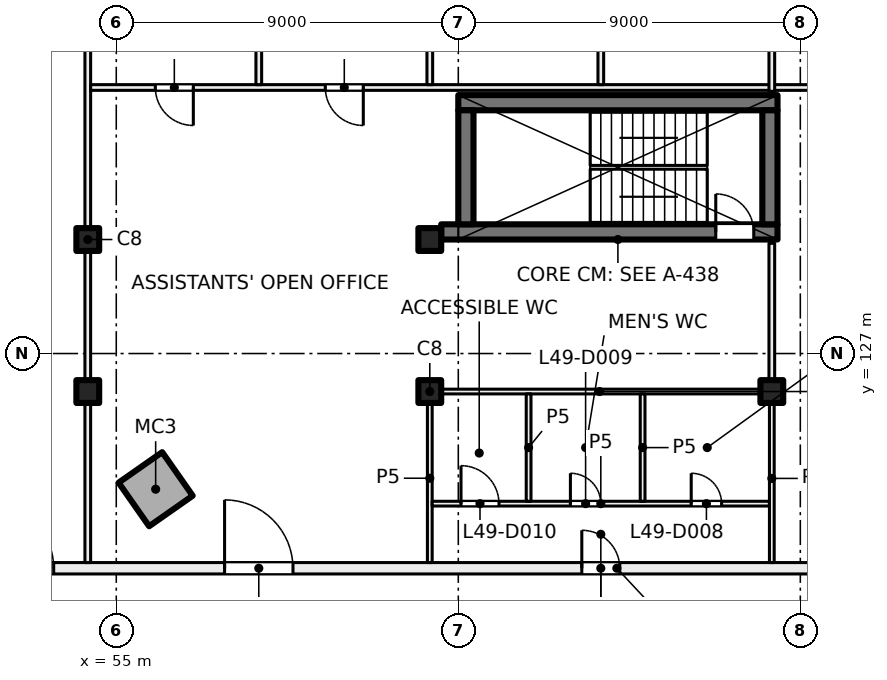
"""IFC4 building model, lengths in metres.
Left out: names, types, materials, properties, quantities, classifications, styles, units other than length and angle.
Written with IfcOpenShell. Run it as: python <this file> out.ifc"""

import sys

from ifc_helpers import new_model, si_unit, direction, frame, frame_2d, origin, origin_2d, place, context, subcontext, project, spatial, rectangle, hollow_rectangle, extrude, element, fill, save


model = new_model("IFC4")
c1 = context("Model", 3, precision=1e-05, world=origin(), true_north=direction((0.0, 1.0)))
c2 = subcontext(c1, "Body", "Model", "MODEL_VIEW")
j1 = project(units=[si_unit("LENGTHUNIT", "METRE"), si_unit("PLANEANGLEUNIT", "RADIAN")], contexts=[c1])
p1 = place(None, origin())
s1 = spatial("IfcSite", under=j1, at=p1, CompositionType="ELEMENT")
p2 = place(p1, origin())
s2 = spatial("IfcBuilding", under=s1, at=p2, CompositionType="ELEMENT")
p3 = place(p2, frame((0.0, 0.0, 208.0)))
s3 = spatial("IfcBuildingStorey", under=s2, at=p3, CompositionType="ELEMENT", Elevation=208.0)
p4 = place(p3, frame((56.036, 123.43, 0.0), z_axis=(0.0, 0.0, 1.0), x_axis=(0.573576436351, -0.819152044289, 0.0)))
e1 = element("IfcColumn", 1, at=p4, inside=s3, PredefinedType="COLUMN", context=c2, shape_type="SweptSolid", body=[
    extrude(hollow_rectangle(XDim=1.4, YDim=1.4, WallThickness=0.032, at=origin_2d()), origin(), (0.0, 0.0, 1.0), 4.0),
])
for number, where, z_axis, x_axis in (
    (2, (54.25, 130.0, 0.0), (0.0, 0.0, 1.0), (1.0, 0.0, 0.0)),
    (3, (63.25, 130.0, 0.0), (0.0, 0.0, 1.0), (1.0, 0.0, 0.0)),
    (4, (54.25, 126.0, 0.0), (0.0, 0.0, 1.0), (1.0, 0.0, 0.0)),
    (5, (63.25, 126.0, 0.0), (0.0, 0.0, 1.0), (1.0, 0.0, 0.0)),
    (6, (72.25, 126.0, 0.0), (0.0, 0.0, 1.0), (1.0, 0.0, 0.0)),
):
    element("IfcColumn", number, at=place(p3, frame(where, z_axis=z_axis, x_axis=x_axis)), inside=s3, PredefinedType="COLUMN", context=c2, shape_type="SweptSolid", body=[
        extrude(rectangle(XDim=0.6, YDim=0.6, at=origin_2d()), origin(), (0.0, 0.0, 1.0), 4.0),
    ])
p5 = place(p3, frame((63.55, 130.2, 0.0), z_axis=(0.0, 0.0, 1.0), x_axis=(1.0, 0.0, 0.0)))
e7 = element("IfcWall", 7, at=p5, inside=s3, PredefinedType="SHEAR", context=c2, shape_type="SweptSolid", body=[
    extrude(rectangle(XDim=8.85, YDim=0.4, at=frame_2d((4.425, 0.0))), origin(), (0.0, 0.0, 1.0), 4.0),
])
p6 = place(p5, frame((7.225, 0.0, 0.0)))
e8 = element("IfcOpeningElement", 8, at=p6, cuts=e7, PredefinedType="OPENING", context=c2, shape_type="SweptSolid", body=[
    extrude(rectangle(XDim=1.0, YDim=2.1, at=frame_2d((0.5, 1.05))), frame((0.0, 0.21, 0.0), z_axis=(0.0, -1.0, 0.0), x_axis=(1.0, 0.0, 0.0)), (0.0, 0.0, 1.0), 0.42),
])
p7 = place(p3, frame((64.0, 133.6, 0.0), z_axis=(0.0, 0.0, 1.0), x_axis=(1.0, 0.0, 0.0)))
e9 = element("IfcWall", 9, at=p7, inside=s3, PredefinedType="SHEAR", context=c2, shape_type="SweptSolid", body=[
    extrude(rectangle(XDim=8.4, YDim=0.4, at=frame_2d((4.2, 0.0))), origin(), (0.0, 0.0, 1.0), 4.0),
])
for number, where, z_axis, x_axis in (
    (10, (64.2, 130.4, 0.0), (0.0, 0.0, 1.0), (0.0, 1.0, 0.0)),
    (11, (72.2, 130.4, 0.0), (0.0, 0.0, 1.0), (0.0, 1.0, 0.0)),
):
    element("IfcWall", number, at=place(p3, frame(where, z_axis=z_axis, x_axis=x_axis)), inside=s3, PredefinedType="SHEAR", context=c2, shape_type="SweptSolid", body=[
        extrude(rectangle(XDim=3.0, YDim=0.4, at=frame_2d((1.5, 0.0))), origin(), (0.0, 0.0, 1.0), 4.0),
    ])
p8 = place(p3, frame((50.506, 121.35, 0.0), z_axis=(0.0, 0.0, 1.0), x_axis=(1.0, 0.0, 0.0)))
e12 = element("IfcWall", 12, at=p8, inside=s3, PredefinedType="PARTITIONING", context=c2, shape_type="SweptSolid", body=[
    extrude(rectangle(XDim=35.332, YDim=0.3, at=frame_2d((17.666, 0.0))), origin(), (0.0, 0.0, 1.0), 3.625),
])
p9 = place(p8, frame((32.394, 0.0, 0.0)))
e13 = element("IfcOpeningElement", 13, at=p9, cuts=e12, PredefinedType="OPENING", context=c2, shape_type="SweptSolid", body=[
    extrude(rectangle(XDim=1.2, YDim=2.1, at=frame_2d((0.6, 1.05))), frame((0.0, 0.16, 0.0), z_axis=(0.0, -1.0, 0.0), x_axis=(1.0, 0.0, 0.0)), (0.0, 0.0, 1.0), 0.32),
])
p10 = place(p8, frame((28.744, 0.0, 0.0)))
e14 = element("IfcOpeningElement", 14, at=p10, cuts=e12, PredefinedType="OPENING", context=c2, shape_type="SweptSolid", body=[
    extrude(rectangle(XDim=1.0, YDim=2.1, at=frame_2d((0.5, 1.05))), frame((0.0, 0.16, 0.0), z_axis=(0.0, -1.0, 0.0), x_axis=(1.0, 0.0, 0.0)), (0.0, 0.0, 1.0), 0.32),
])
p11 = place(p8, frame((23.844, 0.0, 0.0)))
e15 = element("IfcOpeningElement", 15, at=p11, cuts=e12, PredefinedType="OPENING", context=c2, shape_type="SweptSolid", body=[
    extrude(rectangle(XDim=1.8, YDim=2.1, at=frame_2d((0.9, 1.05))), frame((0.0, 0.16, 0.0), z_axis=(0.0, -1.0, 0.0), x_axis=(1.0, 0.0, 0.0)), (0.0, 0.0, 1.0), 0.32),
])
p12 = place(p8, frame((16.744, 0.0, 0.0)))
e16 = element("IfcOpeningElement", 16, at=p12, cuts=e12, PredefinedType="OPENING", context=c2, shape_type="SweptSolid", body=[
    extrude(rectangle(XDim=1.0, YDim=2.1, at=frame_2d((0.5, 1.05))), frame((0.0, 0.16, 0.0), z_axis=(0.0, -1.0, 0.0), x_axis=(1.0, 0.0, 0.0)), (0.0, 0.0, 1.0), 0.32),
])
p13 = place(p8, frame((7.344, 0.0, 0.0)))
e17 = element("IfcOpeningElement", 17, at=p13, cuts=e12, PredefinedType="OPENING", context=c2, shape_type="SweptSolid", body=[
    extrude(rectangle(XDim=1.8, YDim=2.1, at=frame_2d((0.9, 1.05))), frame((0.0, 0.16, 0.0), z_axis=(0.0, -1.0, 0.0), x_axis=(1.0, 0.0, 0.0)), (0.0, 0.0, 1.0), 0.32),
])
p14 = place(p8, frame((1.047, 0.0, 0.0)))
e18 = element("IfcOpeningElement", 18, at=p14, cuts=e12, PredefinedType="OPENING", context=c2, shape_type="SweptSolid", body=[
    extrude(rectangle(XDim=1.8, YDim=2.1, at=frame_2d((0.9, 1.05))), frame((0.0, 0.16, 0.0), z_axis=(0.0, -1.0, 0.0), x_axis=(1.0, 0.0, 0.0)), (0.0, 0.0, 1.0), 0.32),
])
p15 = place(p3, frame((54.25, 121.5, 0.0), z_axis=(0.0, 0.0, 1.0), x_axis=(0.0, 1.0, 0.0)))
e19 = element("IfcWall", 19, at=p15, inside=s3, PredefinedType="PARTITIONING", context=c2, shape_type="SweptSolid", body=[
    extrude(rectangle(XDim=16.9, YDim=0.15, at=frame_2d((8.45, 0.0))), origin(), (0.0, 0.0, 1.0), 3.625),
])
p16 = place(p3, frame((81.325, 134.0, 0.0), z_axis=(0.0, 0.0, 1.0), x_axis=(-1.0, 0.0, 0.0)))
e20 = element("IfcWall", 20, at=p16, inside=s3, PredefinedType="PARTITIONING", context=c2, shape_type="SweptSolid", body=[
    extrude(rectangle(XDim=27.0, YDim=0.15, at=frame_2d((13.5, 0.0))), origin(), (0.0, 0.0, 1.0), 3.625),
])
p17 = place(p16, frame((1.825, 0.0, 0.0)))
e21 = element("IfcOpeningElement", 21, at=p17, cuts=e20, PredefinedType="OPENING", context=c2, shape_type="SweptSolid", body=[
    extrude(rectangle(XDim=1.0, YDim=2.1, at=frame_2d((0.5, 1.05))), frame((0.0, 0.085, 0.0), z_axis=(0.0, -1.0, 0.0), x_axis=(1.0, 0.0, 0.0)), (0.0, 0.0, 1.0), 0.17),
])
p18 = place(p16, frame((6.325, 0.0, 0.0)))
e22 = element("IfcOpeningElement", 22, at=p18, cuts=e20, PredefinedType="OPENING", context=c2, shape_type="SweptSolid", body=[
    extrude(rectangle(XDim=1.0, YDim=2.1, at=frame_2d((0.5, 1.05))), frame((0.0, 0.085, 0.0), z_axis=(0.0, -1.0, 0.0), x_axis=(1.0, 0.0, 0.0)), (0.0, 0.0, 1.0), 0.17),
])
p19 = place(p16, frame((19.825, 0.0, 0.0)))
e23 = element("IfcOpeningElement", 23, at=p19, cuts=e20, PredefinedType="OPENING", context=c2, shape_type="SweptSolid", body=[
    extrude(rectangle(XDim=1.0, YDim=2.1, at=frame_2d((0.5, 1.05))), frame((0.0, 0.085, 0.0), z_axis=(0.0, -1.0, 0.0), x_axis=(1.0, 0.0, 0.0)), (0.0, 0.0, 1.0), 0.17),
])
p20 = place(p16, frame((24.298, 0.0, 0.0)))
e24 = element("IfcOpeningElement", 24, at=p20, cuts=e20, PredefinedType="OPENING", context=c2, shape_type="SweptSolid", body=[
    extrude(rectangle(XDim=1.0, YDim=2.1, at=frame_2d((0.5, 1.05))), frame((0.0, 0.085, 0.0), z_axis=(0.0, -1.0, 0.0), x_axis=(1.0, 0.0, 0.0)), (0.0, 0.0, 1.0), 0.17),
])
p21 = place(p3, frame((58.75, 134.075, 0.0), z_axis=(0.0, 0.0, 1.0), x_axis=(0.0, 1.0, 0.0)))
e25 = element("IfcWall", 25, at=p21, inside=s3, PredefinedType="PARTITIONING", context=c2, shape_type="SweptSolid", body=[
    extrude(rectangle(XDim=4.325, YDim=0.15, at=frame_2d((2.163, 0.0))), origin(), (0.0, 0.0, 1.0), 3.625),
])
p22 = place(p3, frame((63.25, 121.5, 0.0), z_axis=(0.0, 0.0, 1.0), x_axis=(0.0, 1.0, 0.0)))
e26 = element("IfcWall", 26, at=p22, inside=s3, PredefinedType="PARTITIONING", context=c2, shape_type="SweptSolid", body=[
    extrude(rectangle(XDim=4.438, YDim=0.125, at=frame_2d((2.219, 0.0))), origin(), (0.0, 0.0, 1.0), 3.625),
])
p23 = place(p3, frame((63.312, 123.05, 0.0), z_axis=(0.0, 0.0, 1.0), x_axis=(1.0, 0.0, 0.0)))
e27 = element("IfcWall", 27, at=p23, inside=s3, PredefinedType="PARTITIONING", context=c2, shape_type="SweptSolid", body=[
    extrude(rectangle(XDim=8.876, YDim=0.125, at=frame_2d((4.438, 0.0))), origin(), (0.0, 0.0, 1.0), 3.625),
])
p24 = place(p23, frame((6.817, 0.0, 0.0)))
e28 = element("IfcOpeningElement", 28, at=p24, cuts=e27, PredefinedType="OPENING", context=c2, shape_type="SweptSolid", body=[
    extrude(rectangle(XDim=0.8, YDim=2.1, at=frame_2d((0.4, 1.05))), frame((0.0, 0.073, 0.0), z_axis=(0.0, -1.0, 0.0), x_axis=(1.0, 0.0, 0.0)), (0.0, 0.0, 1.0), 0.145),
])
p25 = place(p23, frame((3.638, 0.0, 0.0)))
e29 = element("IfcOpeningElement", 29, at=p25, cuts=e27, PredefinedType="OPENING", context=c2, shape_type="SweptSolid", body=[
    extrude(rectangle(XDim=0.8, YDim=2.1, at=frame_2d((0.4, 1.05))), frame((0.0, 0.073, 0.0), z_axis=(0.0, -1.0, 0.0), x_axis=(1.0, 0.0, 0.0)), (0.0, 0.0, 1.0), 0.145),
])
p26 = place(p23, frame((0.759, 0.0, 0.0)))
e30 = element("IfcOpeningElement", 30, at=p26, cuts=e27, PredefinedType="OPENING", context=c2, shape_type="SweptSolid", body=[
    extrude(rectangle(XDim=1.0, YDim=2.1, at=frame_2d((0.5, 1.05))), frame((0.0, 0.073, 0.0), z_axis=(0.0, -1.0, 0.0), x_axis=(1.0, 0.0, 0.0)), (0.0, 0.0, 1.0), 0.145),
])
p27 = place(p3, frame((63.188, 126.0, 0.0), z_axis=(0.0, 0.0, 1.0), x_axis=(1.0, 0.0, 0.0)))
e31 = element("IfcWall", 31, at=p27, inside=s3, PredefinedType="PARTITIONING", context=c2, shape_type="SweptSolid", body=[
    extrude(rectangle(XDim=9.062, YDim=0.125, at=frame_2d((4.531, 0.0))), origin(), (0.0, 0.0, 1.0), 3.625),
])
p28 = place(p3, frame((63.25, 134.075, 0.0), z_axis=(0.0, 0.0, 1.0), x_axis=(0.0, 1.0, 0.0)))
e32 = element("IfcWall", 32, at=p28, inside=s3, PredefinedType="PARTITIONING", context=c2, shape_type="SweptSolid", body=[
    extrude(rectangle(XDim=4.325, YDim=0.15, at=frame_2d((2.163, 0.0))), origin(), (0.0, 0.0, 1.0), 3.625),
])
p29 = place(p3, frame((65.85, 125.938, 0.0), z_axis=(0.0, 0.0, 1.0), x_axis=(0.0, -1.0, 0.0)))
e33 = element("IfcWall", 33, at=p29, inside=s3, PredefinedType="PARTITIONING", context=c2, shape_type="SweptSolid", body=[
    extrude(rectangle(XDim=2.826, YDim=0.125, at=frame_2d((1.413, 0.0))), origin(), (0.0, 0.0, 1.0), 3.625),
])
p30 = place(p3, frame((67.75, 134.075, 0.0), z_axis=(0.0, 0.0, 1.0), x_axis=(0.0, 1.0, 0.0)))
e34 = element("IfcWall", 34, at=p30, inside=s3, PredefinedType="PARTITIONING", context=c2, shape_type="SweptSolid", body=[
    extrude(rectangle(XDim=4.325, YDim=0.15, at=frame_2d((2.163, 0.0))), origin(), (0.0, 0.0, 1.0), 3.625),
])
p31 = place(p30, frame((1.653, 0.0, 0.0)))
e35 = element("IfcOpeningElement", 35, at=p31, cuts=e34, PredefinedType="OPENING", context=c2, shape_type="SweptSolid", body=[
    extrude(rectangle(XDim=1.0, YDim=2.1, at=frame_2d((0.5, 1.05))), frame((0.0, 0.085, 0.0), z_axis=(0.0, -1.0, 0.0), x_axis=(1.0, 0.0, 0.0)), (0.0, 0.0, 1.0), 0.17),
])
p32 = place(p3, frame((68.85, 125.938, 0.0), z_axis=(0.0, 0.0, 1.0), x_axis=(0.0, -1.0, 0.0)))
e36 = element("IfcWall", 36, at=p32, inside=s3, PredefinedType="PARTITIONING", context=c2, shape_type="SweptSolid", body=[
    extrude(rectangle(XDim=2.826, YDim=0.125, at=frame_2d((1.413, 0.0))), origin(), (0.0, 0.0, 1.0), 3.625),
])
p33 = place(p3, frame((72.25, 121.5, 0.0), z_axis=(0.0, 0.0, 1.0), x_axis=(0.0, 1.0, 0.0)))
e37 = element("IfcWall", 37, at=p33, inside=s3, PredefinedType="PARTITIONING", context=c2, shape_type="SweptSolid", body=[
    extrude(rectangle(XDim=4.428, YDim=0.125, at=frame_2d((2.214, 0.0))), origin(), (0.0, 0.0, 1.0), 3.625),
])
p34 = place(p3, frame((72.25, 126.06, 0.0), z_axis=(0.0, 0.0, 1.0), x_axis=(0.0, 1.0, 0.0)))
e38 = element("IfcWall", 38, at=p34, inside=s3, PredefinedType="PARTITIONING", context=c2, shape_type="SweptSolid", body=[
    extrude(rectangle(XDim=3.84, YDim=0.15, at=frame_2d((1.92, 0.0))), origin(), (0.0, 0.0, 1.0), 3.625),
])
p35 = place(p3, frame((72.25, 133.9, 0.0), z_axis=(0.0, 0.0, 1.0), x_axis=(0.0, 1.0, 0.0)))
e39 = element("IfcWall", 39, at=p35, inside=s3, PredefinedType="PARTITIONING", context=c2, shape_type="SweptSolid", body=[
    extrude(rectangle(XDim=4.5, YDim=0.15, at=frame_2d((2.25, 0.0))), origin(), (0.0, 0.0, 1.0), 3.625),
])
p36 = place(p35, frame((1.8, 0.0, 0.0)))
e40 = element("IfcOpeningElement", 40, at=p36, cuts=e39, PredefinedType="OPENING", context=c2, shape_type="SweptSolid", body=[
    extrude(rectangle(XDim=1.0, YDim=2.1, at=frame_2d((0.5, 1.05))), frame((0.0, 0.085, 0.0), z_axis=(0.0, -1.0, 0.0), x_axis=(1.0, 0.0, 0.0)), (0.0, 0.0, 1.0), 0.17),
])
p37 = place(p6, origin())
e41 = element("IfcDoor", 41, at=p37, inside=s3, OperationType="SINGLE_SWING_LEFT", PredefinedType="DOOR", context=c2, shape_type="SweptSolid", body=[
    extrude(rectangle(XDim=1.0, YDim=2.1, at=frame_2d((0.5, 1.05))), frame((0.0, 0.025, 0.0), z_axis=(0.0, -1.0, 0.0), x_axis=(1.0, 0.0, 0.0)), (0.0, 0.0, 1.0), 0.05),
])
fill(e8, e41)
p38 = place(p12, origin())
e42 = element("IfcDoor", 42, at=p38, inside=s3, OperationType="SINGLE_SWING_LEFT", PredefinedType="DOOR", context=c2, shape_type="SweptSolid", body=[
    extrude(rectangle(XDim=1.0, YDim=2.1, at=frame_2d((0.5, 1.05))), frame((0.0, 0.025, 0.0), z_axis=(0.0, -1.0, 0.0), x_axis=(1.0, 0.0, 0.0)), (0.0, 0.0, 1.0), 0.05),
])
fill(e16, e42)
p39 = place(p24, origin())
e43 = element("IfcDoor", 43, at=p39, inside=s3, OperationType="SINGLE_SWING_RIGHT", PredefinedType="DOOR", context=c2, shape_type="SweptSolid", body=[
    extrude(rectangle(XDim=0.8, YDim=2.1, at=frame_2d((0.4, 1.05))), frame((0.0, 0.025, 0.0), z_axis=(0.0, -1.0, 0.0), x_axis=(1.0, 0.0, 0.0)), (0.0, 0.0, 1.0), 0.05),
])
fill(e28, e43)
p40 = place(p25, origin())
e44 = element("IfcDoor", 44, at=p40, inside=s3, OperationType="SINGLE_SWING_LEFT", PredefinedType="DOOR", context=c2, shape_type="SweptSolid", body=[
    extrude(rectangle(XDim=0.8, YDim=2.1, at=frame_2d((0.4, 1.05))), frame((0.0, 0.025, 0.0), z_axis=(0.0, -1.0, 0.0), x_axis=(1.0, 0.0, 0.0)), (0.0, 0.0, 1.0), 0.05),
])
fill(e29, e44)
p41 = place(p26, origin())
e45 = element("IfcDoor", 45, at=p41, inside=s3, OperationType="SINGLE_SWING_LEFT", PredefinedType="DOOR", context=c2, shape_type="SweptSolid", body=[
    extrude(rectangle(XDim=1.0, YDim=2.1, at=frame_2d((0.5, 1.05))), frame((0.0, 0.025, 0.0), z_axis=(0.0, -1.0, 0.0), x_axis=(1.0, 0.0, 0.0)), (0.0, 0.0, 1.0), 0.05),
])
fill(e30, e45)
p42 = place(p19, origin())
e46 = element("IfcDoor", 46, at=p42, inside=s3, OperationType="SINGLE_SWING_LEFT", PredefinedType="DOOR", context=c2, shape_type="SweptSolid", body=[
    extrude(rectangle(XDim=1.0, YDim=2.1, at=frame_2d((0.5, 1.05))), frame((0.0, 0.025, 0.0), z_axis=(0.0, -1.0, 0.0), x_axis=(1.0, 0.0, 0.0)), (0.0, 0.0, 1.0), 0.05),
])
fill(e23, e46)
p43 = place(p20, origin())
e47 = element("IfcDoor", 47, at=p43, inside=s3, OperationType="SINGLE_SWING_LEFT", PredefinedType="DOOR", context=c2, shape_type="SweptSolid", body=[
    extrude(rectangle(XDim=1.0, YDim=2.1, at=frame_2d((0.5, 1.05))), frame((0.0, 0.025, 0.0), z_axis=(0.0, -1.0, 0.0), x_axis=(1.0, 0.0, 0.0)), (0.0, 0.0, 1.0), 0.05),
])
fill(e24, e47)
p44 = place(p13, origin())
e48 = element("IfcDoor", 48, at=p44, inside=s3, OperationType="DOUBLE_DOOR_SINGLE_SWING", PredefinedType="DOOR", context=c2, shape_type="SweptSolid", body=[
    extrude(rectangle(XDim=1.8, YDim=2.1, at=frame_2d((0.9, 1.05))), frame((0.0, 0.025, 0.0), z_axis=(0.0, -1.0, 0.0), x_axis=(1.0, 0.0, 0.0)), (0.0, 0.0, 1.0), 0.05),
])
fill(e17, e48)
p45 = place(p14, origin())
e49 = element("IfcDoor", 49, at=p45, inside=s3, OperationType="DOUBLE_DOOR_SINGLE_SWING", PredefinedType="DOOR", context=c2, shape_type="SweptSolid", body=[
    extrude(rectangle(XDim=1.8, YDim=2.1, at=frame_2d((0.9, 1.05))), frame((0.0, 0.025, 0.0), z_axis=(0.0, -1.0, 0.0), x_axis=(1.0, 0.0, 0.0)), (0.0, 0.0, 1.0), 0.05),
])
fill(e18, e49)
save(model, sys.argv[1])
